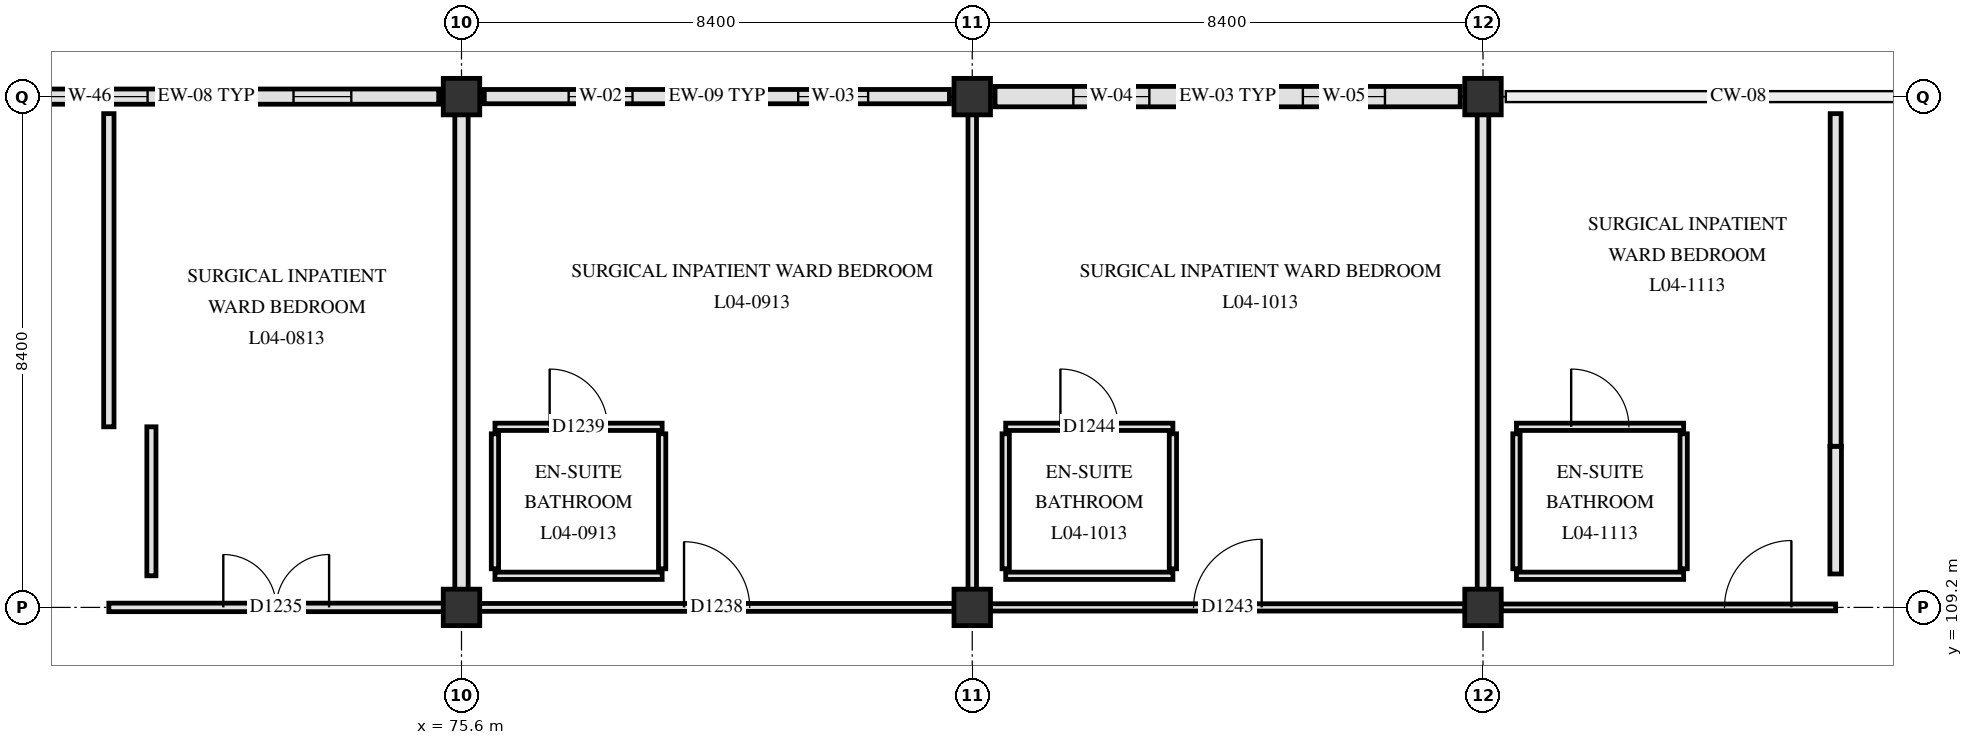
"""IFC4 building model, lengths in metres.
Left out: names, types, materials, properties, quantities, classifications, styles, units other than length and angle.
Written with IfcOpenShell. Run it as: python <this file> out.ifc"""

import sys

from ifc_helpers import new_model, si_unit, direction, frame, frame_2d, origin, origin_2d, place, context, subcontext, project, spatial, rectangle, extrude, element, fill, save


model = new_model("IFC4")
c1 = context("Model", 3, precision=1e-05, world=origin(), true_north=direction((0.0, 1.0)))
c2 = subcontext(c1, "Body", "Model", "MODEL_VIEW")
j1 = project(units=[si_unit("LENGTHUNIT", "METRE"), si_unit("PLANEANGLEUNIT", "RADIAN")], contexts=[c1])
p1 = place(None, origin())
s1 = spatial("IfcSite", under=j1, at=p1, CompositionType="ELEMENT")
p2 = place(p1, origin())
s2 = spatial("IfcBuilding", under=s1, at=p2, CompositionType="ELEMENT")
p3 = place(p2, frame((0.0, 0.0, 18.6)))
s3 = spatial("IfcBuildingStorey", under=s2, at=p3, CompositionType="ELEMENT", Elevation=18.6)
for number, where, z_axis, x_axis in (
    (1, (75.6, 109.2, 0.0), (0.0, 0.0, 1.0), (1.0, 0.0, 0.0)),
    (2, (75.6, 117.6, 0.0), (0.0, 0.0, 1.0), (1.0, 0.0, 0.0)),
    (3, (84.0, 109.2, 0.0), (0.0, 0.0, 1.0), (1.0, 0.0, 0.0)),
    (4, (84.0, 117.6, 0.0), (0.0, 0.0, 1.0), (1.0, 0.0, 0.0)),
    (5, (92.4, 109.2, 0.0), (0.0, 0.0, 1.0), (1.0, 0.0, 0.0)),
    (6, (92.4, 117.6, 0.0), (0.0, 0.0, 1.0), (1.0, 0.0, 0.0)),
):
    element("IfcColumn", number, at=place(p3, frame(where, z_axis=z_axis, x_axis=x_axis)), inside=s3, PredefinedType="COLUMN", context=c2, shape_type="SweptSolid", body=[
        extrude(rectangle(XDim=0.6, YDim=0.6, at=origin_2d()), origin(), (0.0, 0.0, 1.0), 3.9),
    ])
p4 = place(p3, frame((67.575, 117.6, 0.0), z_axis=(0.0, 0.0, 1.0), x_axis=(1.0, 0.0, 0.0)))
e7 = element("IfcWall", 7, at=p4, inside=s3, PredefinedType="SOLIDWALL", context=c2, shape_type="SweptSolid", body=[
    extrude(rectangle(XDim=7.65, YDim=0.25, at=frame_2d((3.825, 0.0))), origin(), (0.0, 0.0, 1.0), 3.31),
])
p5 = place(p4, frame((0.962, 0.0, 0.85)))
e8 = element("IfcOpeningElement", 8, at=p5, cuts=e7, PredefinedType="OPENING", context=c2, shape_type="SweptSolid", body=[
    extrude(rectangle(XDim=1.9, YDim=1.78, at=frame_2d((0.95, 0.89))), frame((0.0, 0.135, 0.0), z_axis=(0.0, -1.0, 0.0), x_axis=(1.0, 0.0, 0.0)), (0.0, 0.0, 1.0), 0.27),
])
p6 = place(p4, frame((5.262, 0.0, 0.85)))
e9 = element("IfcOpeningElement", 9, at=p6, cuts=e7, PredefinedType="OPENING", context=c2, shape_type="SweptSolid", body=[
    extrude(rectangle(XDim=0.95, YDim=1.3, at=frame_2d((0.475, 0.65))), frame((0.0, 0.135, 0.0), z_axis=(0.0, -1.0, 0.0), x_axis=(1.0, 0.0, 0.0)), (0.0, 0.0, 1.0), 0.27),
])
p7 = place(p3, frame((75.975, 117.6, 0.0), z_axis=(0.0, 0.0, 1.0), x_axis=(1.0, 0.0, 0.0)))
e10 = element("IfcWall", 10, at=p7, inside=s3, PredefinedType="SOLIDWALL", context=c2, shape_type="SweptSolid", body=[
    extrude(rectangle(XDim=7.65, YDim=0.235, at=frame_2d((3.825, 0.0))), origin(), (0.0, 0.0, 1.0), 3.31),
])
p8 = place(p7, frame((1.387, 0.0, 0.85)))
e11 = element("IfcOpeningElement", 11, at=p8, cuts=e10, PredefinedType="OPENING", context=c2, shape_type="SweptSolid", body=[
    extrude(rectangle(XDim=1.05, YDim=1.3, at=frame_2d((0.525, 0.65))), frame((0.0, 0.127, 0.0), z_axis=(0.0, -1.0, 0.0), x_axis=(1.0, 0.0, 0.0)), (0.0, 0.0, 1.0), 0.255),
])
p9 = place(p7, frame((5.163, 0.0, 0.85)))
e12 = element("IfcOpeningElement", 12, at=p9, cuts=e10, PredefinedType="OPENING", context=c2, shape_type="SweptSolid", body=[
    extrude(rectangle(XDim=1.15, YDim=1.3, at=frame_2d((0.575, 0.65))), frame((0.0, 0.127, 0.0), z_axis=(0.0, -1.0, 0.0), x_axis=(1.0, 0.0, 0.0)), (0.0, 0.0, 1.0), 0.255),
])
p10 = place(p3, frame((84.375, 117.6, 0.0), z_axis=(0.0, 0.0, 1.0), x_axis=(1.0, 0.0, 0.0)))
e13 = element("IfcWall", 13, at=p10, inside=s3, PredefinedType="SOLIDWALL", context=c2, shape_type="SweptSolid", body=[
    extrude(rectangle(XDim=7.65, YDim=0.335, at=frame_2d((3.825, 0.0))), origin(), (0.0, 0.0, 1.0), 3.31),
])
p11 = place(p10, frame((1.288, 0.0, 0.85)))
e14 = element("IfcOpeningElement", 14, at=p11, cuts=e13, PredefinedType="OPENING", context=c2, shape_type="SweptSolid", body=[
    extrude(rectangle(XDim=1.25, YDim=1.3, at=frame_2d((0.625, 0.65))), frame((0.0, 0.177, 0.0), z_axis=(0.0, -1.0, 0.0), x_axis=(1.0, 0.0, 0.0)), (0.0, 0.0, 1.0), 0.355),
])
p12 = place(p10, frame((5.062, 0.0, 0.85)))
e15 = element("IfcOpeningElement", 15, at=p12, cuts=e13, PredefinedType="OPENING", context=c2, shape_type="SweptSolid", body=[
    extrude(rectangle(XDim=1.35, YDim=1.3, at=frame_2d((0.675, 0.65))), frame((0.0, 0.177, 0.0), z_axis=(0.0, -1.0, 0.0), x_axis=(1.0, 0.0, 0.0)), (0.0, 0.0, 1.0), 0.355),
])
p13 = place(p3, frame((69.8, 109.2, 0.0), z_axis=(0.0, 0.0, 1.0), x_axis=(1.0, 0.0, 0.0)))
e16 = element("IfcWall", 16, at=p13, inside=s3, PredefinedType="PARTITIONING", context=c2, shape_type="SweptSolid", body=[
    extrude(rectangle(XDim=5.505, YDim=0.14, at=frame_2d((2.752, 0.0))), origin(), (0.0, 0.0, 1.0), 3.16),
])
p14 = place(p13, frame((1.883, 0.0, 0.0)))
e17 = element("IfcOpeningElement", 17, at=p14, cuts=e16, PredefinedType="OPENING", context=c2, shape_type="SweptSolid", body=[
    extrude(rectangle(XDim=1.74, YDim=2.24, at=frame_2d((0.87, 1.12))), frame((0.0, 0.08, 0.0), z_axis=(0.0, -1.0, 0.0), x_axis=(1.0, 0.0, 0.0)), (0.0, 0.0, 1.0), 0.16),
])
p15 = place(p3, frame((75.895, 109.2, 0.0), z_axis=(0.0, 0.0, 1.0), x_axis=(1.0, 0.0, 0.0)))
e18 = element("IfcWall", 18, at=p15, inside=s3, PredefinedType="PARTITIONING", context=c2, shape_type="SweptSolid", body=[
    extrude(rectangle(XDim=7.81, YDim=0.13, at=frame_2d((3.905, 0.0))), origin(), (0.0, 0.0, 1.0), 3.16),
])
p16 = place(p15, frame((3.365, 0.0, 0.0)))
e19 = element("IfcOpeningElement", 19, at=p16, cuts=e18, PredefinedType="OPENING", context=c2, shape_type="SweptSolid", body=[
    extrude(rectangle(XDim=1.08, YDim=2.12, at=frame_2d((0.54, 1.06))), frame((0.0, 0.075, 0.0), z_axis=(0.0, -1.0, 0.0), x_axis=(1.0, 0.0, 0.0)), (0.0, 0.0, 1.0), 0.15),
])
p17 = place(p3, frame((84.295, 109.2, 0.0), z_axis=(0.0, 0.0, 1.0), x_axis=(1.0, 0.0, 0.0)))
e20 = element("IfcWall", 20, at=p17, inside=s3, PredefinedType="PARTITIONING", context=c2, shape_type="SweptSolid", body=[
    extrude(rectangle(XDim=7.81, YDim=0.12, at=frame_2d((3.905, 0.0))), origin(), (0.0, 0.0, 1.0), 3.16),
])
p18 = place(p17, frame((3.345, 0.0, 0.0)))
e21 = element("IfcOpeningElement", 21, at=p18, cuts=e20, PredefinedType="OPENING", context=c2, shape_type="SweptSolid", body=[
    extrude(rectangle(XDim=1.12, YDim=2.18, at=frame_2d((0.56, 1.09))), frame((0.0, 0.07, 0.0), z_axis=(0.0, -1.0, 0.0), x_axis=(1.0, 0.0, 0.0)), (0.0, 0.0, 1.0), 0.14),
])
p19 = place(p3, frame((92.695, 109.2, 0.0), z_axis=(0.0, 0.0, 1.0), x_axis=(1.0, 0.0, 0.0)))
e22 = element("IfcWall", 22, at=p19, inside=s3, PredefinedType="PARTITIONING", context=c2, shape_type="SweptSolid", body=[
    extrude(rectangle(XDim=5.505, YDim=0.112, at=frame_2d((2.752, 0.0))), origin(), (0.0, 0.0, 1.0), 3.16),
])
p20 = place(p19, frame((3.677, 0.0, 0.0)))
e23 = element("IfcOpeningElement", 23, at=p20, cuts=e22, PredefinedType="OPENING", context=c2, shape_type="SweptSolid", body=[
    extrude(rectangle(XDim=1.1, YDim=2.15, at=frame_2d((0.55, 1.075))), frame((0.0, 0.066, 0.0), z_axis=(0.0, -1.0, 0.0), x_axis=(1.0, 0.0, 0.0)), (0.0, 0.0, 1.0), 0.132),
])
for number, where, z_axis, x_axis in (
    (24, (76.15, 109.72, 0.0), (0.0, 0.0, 1.0), (1.0, 0.0, 0.0)),
    (25, (84.55, 109.72, 0.0), (0.0, 0.0, 1.0), (1.0, 0.0, 0.0)),
    (26, (92.95, 109.72, 0.0), (0.0, 0.0, 1.0), (1.0, 0.0, 0.0)),
):
    element("IfcWall", number, at=place(p3, frame(where, z_axis=z_axis, x_axis=x_axis)), inside=s3, PredefinedType="PARTITIONING", context=c2, shape_type="SweptSolid", body=[
        extrude(rectangle(XDim=2.75, YDim=0.12, at=frame_2d((1.375, 0.0))), origin(), (0.0, 0.0, 1.0), 3.61),
    ])
p21 = place(p3, frame((76.15, 112.17, 0.0), z_axis=(0.0, 0.0, 1.0), x_axis=(1.0, 0.0, 0.0)))
e27 = element("IfcWall", 27, at=p21, inside=s3, PredefinedType="PARTITIONING", context=c2, shape_type="SweptSolid", body=[
    extrude(rectangle(XDim=2.75, YDim=0.12, at=frame_2d((1.375, 0.0))), origin(), (0.0, 0.0, 1.0), 3.61),
])
p22 = place(p21, frame((0.9, 0.0, 0.0)))
e28 = element("IfcOpeningElement", 28, at=p22, cuts=e27, PredefinedType="OPENING", context=c2, shape_type="SweptSolid", body=[
    extrude(rectangle(XDim=0.95, YDim=2.1, at=frame_2d((0.475, 1.05))), frame((0.0, 0.07, 0.0), z_axis=(0.0, -1.0, 0.0), x_axis=(1.0, 0.0, 0.0)), (0.0, 0.0, 1.0), 0.14),
])
p23 = place(p3, frame((84.55, 112.17, 0.0), z_axis=(0.0, 0.0, 1.0), x_axis=(1.0, 0.0, 0.0)))
e29 = element("IfcWall", 29, at=p23, inside=s3, PredefinedType="PARTITIONING", context=c2, shape_type="SweptSolid", body=[
    extrude(rectangle(XDim=2.75, YDim=0.12, at=frame_2d((1.375, 0.0))), origin(), (0.0, 0.0, 1.0), 3.61),
])
p24 = place(p23, frame((0.9, 0.0, 0.0)))
e30 = element("IfcOpeningElement", 30, at=p24, cuts=e29, PredefinedType="OPENING", context=c2, shape_type="SweptSolid", body=[
    extrude(rectangle(XDim=0.95, YDim=2.1, at=frame_2d((0.475, 1.05))), frame((0.0, 0.07, 0.0), z_axis=(0.0, -1.0, 0.0), x_axis=(1.0, 0.0, 0.0)), (0.0, 0.0, 1.0), 0.14),
])
p25 = place(p3, frame((92.95, 112.17, 0.0), z_axis=(0.0, 0.0, 1.0), x_axis=(1.0, 0.0, 0.0)))
e31 = element("IfcWall", 31, at=p25, inside=s3, PredefinedType="PARTITIONING", context=c2, shape_type="SweptSolid", body=[
    extrude(rectangle(XDim=2.75, YDim=0.12, at=frame_2d((1.375, 0.0))), origin(), (0.0, 0.0, 1.0), 3.61),
])
p26 = place(p25, frame((0.9, 0.0, 0.0)))
e32 = element("IfcOpeningElement", 32, at=p26, cuts=e31, PredefinedType="OPENING", context=c2, shape_type="SweptSolid", body=[
    extrude(rectangle(XDim=0.95, YDim=2.1, at=frame_2d((0.475, 1.05))), frame((0.0, 0.07, 0.0), z_axis=(0.0, -1.0, 0.0), x_axis=(1.0, 0.0, 0.0)), (0.0, 0.0, 1.0), 0.14),
])
p27 = place(p3, frame((69.8, 112.17, 0.0), z_axis=(0.0, 0.0, 1.0), x_axis=(0.0, 1.0, 0.0)))
e33 = element("IfcWall", 33, at=p27, inside=s3, PredefinedType="PARTITIONING", context=c2, shape_type="SweptSolid", body=[
    extrude(rectangle(XDim=5.15, YDim=0.17, at=frame_2d((2.575, 0.0))), origin(), (0.0, 0.0, 1.0), 3.31),
])
p28 = place(p3, frame((70.5, 109.72, 0.0), z_axis=(0.0, 0.0, 1.0), x_axis=(0.0, 1.0, 0.0)))
e34 = element("IfcWall", 34, at=p28, inside=s3, PredefinedType="PARTITIONING", context=c2, shape_type="SweptSolid", body=[
    extrude(rectangle(XDim=2.45, YDim=0.15, at=frame_2d((1.225, 0.0))), origin(), (0.0, 0.0, 1.0), 3.31),
])
p29 = place(p3, frame((75.6, 109.495, 0.0), z_axis=(0.0, 0.0, 1.0), x_axis=(0.0, 1.0, 0.0)))
e35 = element("IfcWall", 35, at=p29, inside=s3, PredefinedType="PARTITIONING", context=c2, shape_type="SweptSolid", body=[
    extrude(rectangle(XDim=7.81, YDim=0.22, at=frame_2d((3.905, 0.0))), origin(), (0.0, 0.0, 1.0), 3.26),
])
for number, where, z_axis, x_axis in (
    (36, (76.15, 109.835, 0.0), (0.0, 0.0, 1.0), (0.0, 1.0, 0.0)),
    (37, (78.9, 109.835, 0.0), (0.0, 0.0, 1.0), (0.0, 1.0, 0.0)),
):
    element("IfcWall", number, at=place(p3, frame(where, z_axis=z_axis, x_axis=x_axis)), inside=s3, PredefinedType="PARTITIONING", context=c2, shape_type="SweptSolid", body=[
        extrude(rectangle(XDim=2.22, YDim=0.12, at=frame_2d((1.11, 0.0))), origin(), (0.0, 0.0, 1.0), 3.31),
    ])
p30 = place(p3, frame((84.0, 109.495, 0.0), z_axis=(0.0, 0.0, 1.0), x_axis=(0.0, 1.0, 0.0)))
e38 = element("IfcWall", 38, at=p30, inside=s3, PredefinedType="PARTITIONING", context=c2, shape_type="SweptSolid", body=[
    extrude(rectangle(XDim=7.81, YDim=0.14, at=frame_2d((3.905, 0.0))), origin(), (0.0, 0.0, 1.0), 3.26),
])
for number, where, z_axis, x_axis in (
    (39, (84.55, 109.835, 0.0), (0.0, 0.0, 1.0), (0.0, 1.0, 0.0)),
    (40, (87.3, 109.835, 0.0), (0.0, 0.0, 1.0), (0.0, 1.0, 0.0)),
):
    element("IfcWall", number, at=place(p3, frame(where, z_axis=z_axis, x_axis=x_axis)), inside=s3, PredefinedType="PARTITIONING", context=c2, shape_type="SweptSolid", body=[
        extrude(rectangle(XDim=2.22, YDim=0.12, at=frame_2d((1.11, 0.0))), origin(), (0.0, 0.0, 1.0), 3.31),
    ])
p31 = place(p3, frame((92.4, 109.495, 0.0), z_axis=(0.0, 0.0, 1.0), x_axis=(0.0, 1.0, 0.0)))
e41 = element("IfcWall", 41, at=p31, inside=s3, PredefinedType="PARTITIONING", context=c2, shape_type="SweptSolid", body=[
    extrude(rectangle(XDim=7.81, YDim=0.19, at=frame_2d((3.905, 0.0))), origin(), (0.0, 0.0, 1.0), 3.26),
])
for number, where, z_axis, x_axis in (
    (42, (92.95, 109.835, 0.0), (0.0, 0.0, 1.0), (0.0, 1.0, 0.0)),
    (43, (95.7, 109.835, 0.0), (0.0, 0.0, 1.0), (0.0, 1.0, 0.0)),
):
    element("IfcWall", number, at=place(p3, frame(where, z_axis=z_axis, x_axis=x_axis)), inside=s3, PredefinedType="PARTITIONING", context=c2, shape_type="SweptSolid", body=[
        extrude(rectangle(XDim=2.22, YDim=0.12, at=frame_2d((1.11, 0.0))), origin(), (0.0, 0.0, 1.0), 3.31),
    ])
p32 = place(p3, frame((98.2, 109.75, 0.0), z_axis=(0.0, 0.0, 1.0), x_axis=(0.0, 1.0, 0.0)))
e44 = element("IfcWall", 44, at=p32, inside=s3, PredefinedType="PARTITIONING", context=c2, shape_type="SweptSolid", body=[
    extrude(rectangle(XDim=2.1, YDim=0.19, at=frame_2d((1.05, 0.0))), origin(), (0.0, 0.0, 1.0), 3.61),
])
p33 = place(p3, frame((98.2, 111.85, 0.0), z_axis=(0.0, 0.0, 1.0), x_axis=(0.0, 1.0, 0.0)))
e45 = element("IfcWall", 45, at=p33, inside=s3, PredefinedType="PARTITIONING", context=c2, shape_type="SweptSolid", body=[
    extrude(rectangle(XDim=5.47, YDim=0.18, at=frame_2d((2.735, 0.0))), origin(), (0.0, 0.0, 1.0), 3.31),
])
p34 = place(p5, origin())
e46 = element("IfcWindow", 46, at=p34, inside=s3, PartitioningType="SINGLE_PANEL", PredefinedType="WINDOW", context=c2, shape_type="SweptSolid", body=[
    extrude(rectangle(XDim=1.9, YDim=1.78, at=frame_2d((0.95, 0.89))), frame((0.0, 0.03, 0.0), z_axis=(0.0, -1.0, 0.0), x_axis=(1.0, 0.0, 0.0)), (0.0, 0.0, 1.0), 0.06),
])
fill(e8, e46)
p35 = place(p6, origin())
e47 = element("IfcWindow", 47, at=p35, inside=s3, PartitioningType="SINGLE_PANEL", PredefinedType="WINDOW", context=c2, shape_type="SweptSolid", body=[
    extrude(rectangle(XDim=0.95, YDim=1.3, at=frame_2d((0.475, 0.65))), frame((0.0, 0.03, 0.0), z_axis=(0.0, -1.0, 0.0), x_axis=(1.0, 0.0, 0.0)), (0.0, 0.0, 1.0), 0.06),
])
fill(e9, e47)
p36 = place(p8, origin())
e48 = element("IfcWindow", 48, at=p36, inside=s3, PartitioningType="SINGLE_PANEL", PredefinedType="WINDOW", context=c2, shape_type="SweptSolid", body=[
    extrude(rectangle(XDim=1.05, YDim=1.3, at=frame_2d((0.525, 0.65))), frame((0.0, 0.03, 0.0), z_axis=(0.0, -1.0, 0.0), x_axis=(1.0, 0.0, 0.0)), (0.0, 0.0, 1.0), 0.06),
])
fill(e11, e48)
p37 = place(p9, origin())
e49 = element("IfcWindow", 49, at=p37, inside=s3, PartitioningType="SINGLE_PANEL", PredefinedType="WINDOW", context=c2, shape_type="SweptSolid", body=[
    extrude(rectangle(XDim=1.15, YDim=1.3, at=frame_2d((0.575, 0.65))), frame((0.0, 0.03, 0.0), z_axis=(0.0, -1.0, 0.0), x_axis=(1.0, 0.0, 0.0)), (0.0, 0.0, 1.0), 0.06),
])
fill(e12, e49)
p38 = place(p11, origin())
e50 = element("IfcWindow", 50, at=p38, inside=s3, PartitioningType="SINGLE_PANEL", PredefinedType="WINDOW", context=c2, shape_type="SweptSolid", body=[
    extrude(rectangle(XDim=1.25, YDim=1.3, at=frame_2d((0.625, 0.65))), frame((0.0, 0.03, 0.0), z_axis=(0.0, -1.0, 0.0), x_axis=(1.0, 0.0, 0.0)), (0.0, 0.0, 1.0), 0.06),
])
fill(e14, e50)
p39 = place(p12, origin())
e51 = element("IfcWindow", 51, at=p39, inside=s3, PartitioningType="SINGLE_PANEL", PredefinedType="WINDOW", context=c2, shape_type="SweptSolid", body=[
    extrude(rectangle(XDim=1.35, YDim=1.3, at=frame_2d((0.675, 0.65))), frame((0.0, 0.03, 0.0), z_axis=(0.0, -1.0, 0.0), x_axis=(1.0, 0.0, 0.0)), (0.0, 0.0, 1.0), 0.06),
])
fill(e15, e51)
p40 = place(p14, origin())
e52 = element("IfcDoor", 52, at=p40, inside=s3, OperationType="DOUBLE_SWING_RIGHT", PredefinedType="DOOR", context=c2, shape_type="SweptSolid", body=[
    extrude(rectangle(XDim=1.74, YDim=2.24, at=frame_2d((0.87, 1.12))), frame((0.0, 0.025, 0.0), z_axis=(0.0, -1.0, 0.0), x_axis=(1.0, 0.0, 0.0)), (0.0, 0.0, 1.0), 0.05),
])
fill(e17, e52)
p41 = place(p16, origin())
e53 = element("IfcDoor", 53, at=p41, inside=s3, OperationType="SINGLE_SWING_LEFT", PredefinedType="DOOR", context=c2, shape_type="SweptSolid", body=[
    extrude(rectangle(XDim=1.08, YDim=2.12, at=frame_2d((0.54, 1.06))), frame((0.0, 0.025, 0.0), z_axis=(0.0, -1.0, 0.0), x_axis=(1.0, 0.0, 0.0)), (0.0, 0.0, 1.0), 0.05),
])
fill(e19, e53)
p42 = place(p22, origin())
e54 = element("IfcDoor", 54, at=p42, inside=s3, OperationType="SINGLE_SWING_LEFT", PredefinedType="DOOR", context=c2, shape_type="SweptSolid", body=[
    extrude(rectangle(XDim=0.95, YDim=2.1, at=frame_2d((0.475, 1.05))), frame((0.0, 0.025, 0.0), z_axis=(0.0, -1.0, 0.0), x_axis=(1.0, 0.0, 0.0)), (0.0, 0.0, 1.0), 0.05),
])
fill(e28, e54)
p43 = place(p18, origin())
e55 = element("IfcDoor", 55, at=p43, inside=s3, OperationType="SINGLE_SWING_RIGHT", PredefinedType="DOOR", context=c2, shape_type="SweptSolid", body=[
    extrude(rectangle(XDim=1.12, YDim=2.18, at=frame_2d((0.56, 1.09))), frame((0.0, 0.025, 0.0), z_axis=(0.0, -1.0, 0.0), x_axis=(1.0, 0.0, 0.0)), (0.0, 0.0, 1.0), 0.05),
])
fill(e21, e55)
p44 = place(p24, origin())
e56 = element("IfcDoor", 56, at=p44, inside=s3, OperationType="SINGLE_SWING_LEFT", PredefinedType="DOOR", context=c2, shape_type="SweptSolid", body=[
    extrude(rectangle(XDim=0.95, YDim=2.1, at=frame_2d((0.475, 1.05))), frame((0.0, 0.025, 0.0), z_axis=(0.0, -1.0, 0.0), x_axis=(1.0, 0.0, 0.0)), (0.0, 0.0, 1.0), 0.05),
])
fill(e30, e56)
p45 = place(p20, origin())
e57 = element("IfcDoor", 57, at=p45, inside=s3, OperationType="SINGLE_SWING_RIGHT", PredefinedType="DOOR", context=c2, shape_type="SweptSolid", body=[
    extrude(rectangle(XDim=1.1, YDim=2.15, at=frame_2d((0.55, 1.075))), frame((0.0, 0.025, 0.0), z_axis=(0.0, -1.0, 0.0), x_axis=(1.0, 0.0, 0.0)), (0.0, 0.0, 1.0), 0.05),
])
fill(e23, e57)
p46 = place(p26, origin())
e58 = element("IfcDoor", 58, at=p46, inside=s3, OperationType="SINGLE_SWING_LEFT", PredefinedType="DOOR", context=c2, shape_type="SweptSolid", body=[
    extrude(rectangle(XDim=0.95, YDim=2.1, at=frame_2d((0.475, 1.05))), frame((0.0, 0.025, 0.0), z_axis=(0.0, -1.0, 0.0), x_axis=(1.0, 0.0, 0.0)), (0.0, 0.0, 1.0), 0.05),
])
fill(e32, e58)
save(model, sys.argv[1])
